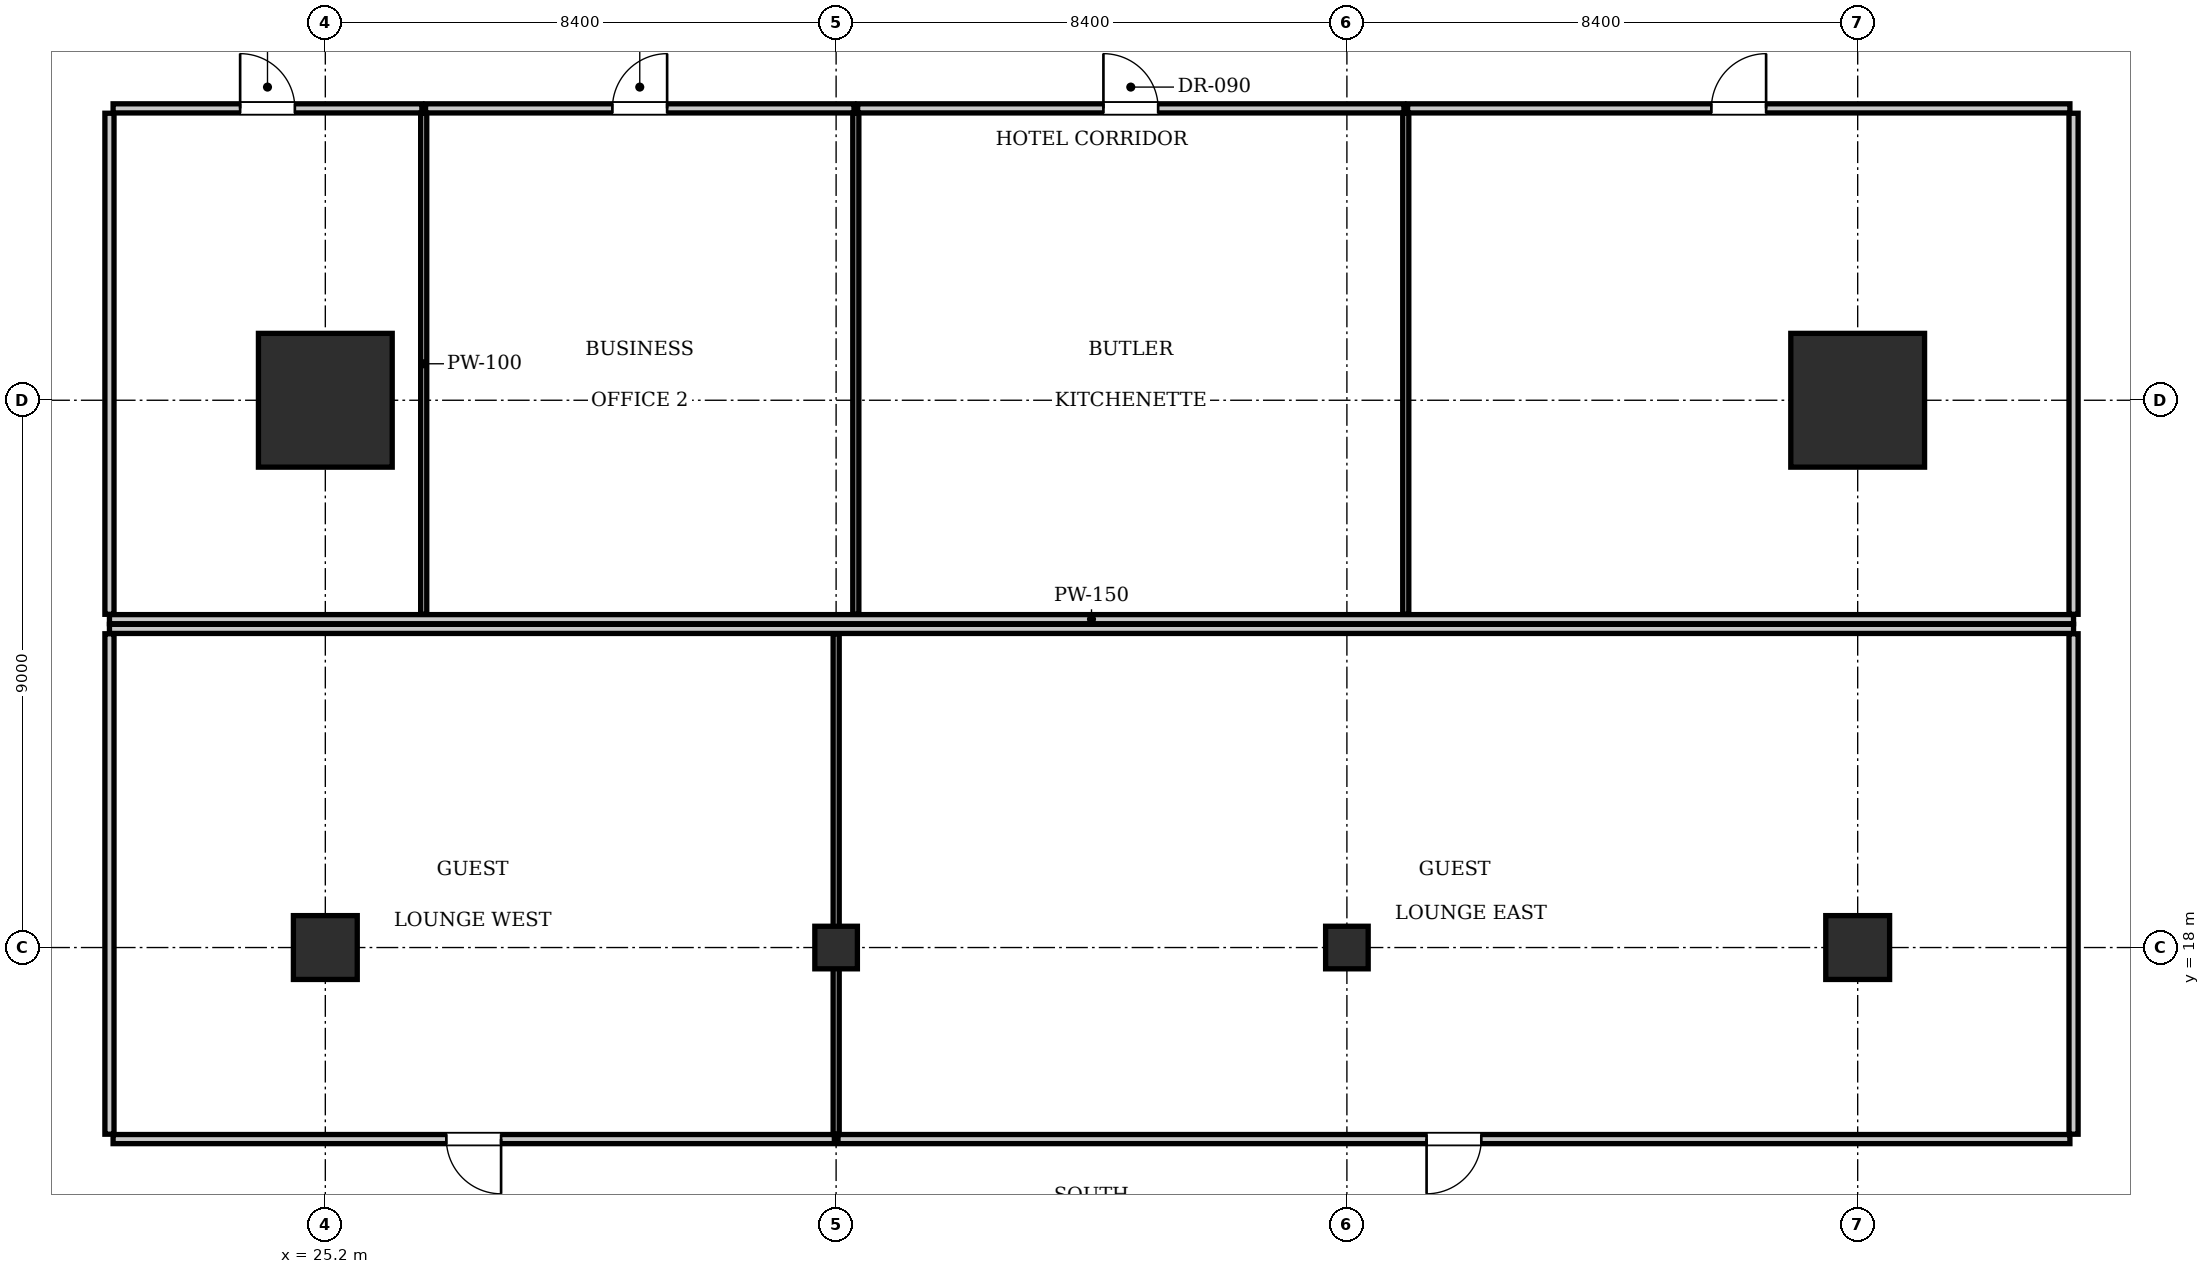
"""IFC4 building model, lengths in metres.
Left out: names, types, materials, properties, quantities, classifications, styles, units other than length and angle.
Written with IfcOpenShell. Run it as: python <this file> out.ifc"""

import sys

from ifc_helpers import new_model, si_unit, direction, frame, frame_2d, origin, origin_2d, place, context, subcontext, project, spatial, rectangle, i_section, extrude, element, fill, save


model = new_model("IFC4")
c1 = context("Model", 3, precision=1e-05, world=origin(), true_north=direction((0.0, 1.0)))
c2 = subcontext(c1, "Body", "Model", "MODEL_VIEW")
j1 = project(units=[si_unit("LENGTHUNIT", "METRE"), si_unit("PLANEANGLEUNIT", "RADIAN")], contexts=[c1])
p1 = place(None, origin())
s1 = spatial("IfcSite", under=j1, at=p1, CompositionType="ELEMENT")
p2 = place(p1, origin())
s2 = spatial("IfcBuilding", under=s1, at=p2, CompositionType="ELEMENT")
p3 = place(p2, frame((0.0, 0.0, 34.65)))
s3 = spatial("IfcBuildingStorey", under=s2, at=p3, CompositionType="ELEMENT", Elevation=34.65)
for number, where, z_axis, x_axis in (
    (1, (25.2, 27.0, 0.0), (0.0, 0.0, 1.0), (1.0, 0.0, 0.0)),
    (2, (50.4, 27.0, 0.0), (0.0, 0.0, 1.0), (1.0, 0.0, 0.0)),
):
    element("IfcColumn", number, at=place(p3, frame(where, z_axis=z_axis, x_axis=x_axis)), inside=s3, PredefinedType="COLUMN", context=c2, shape_type="SweptSolid", body=[
        extrude(rectangle(XDim=2.2, YDim=2.2, at=origin_2d()), origin(), (0.0, 0.0, 1.0), 3.85),
    ])
for number, where, z_axis, x_axis in (
    (3, (25.2, 18.0, 0.0), (0.0, 0.0, 1.0), (1.0, 0.0, 0.0)),
    (4, (50.4, 18.0, 0.0), (0.0, 0.0, 1.0), (1.0, 0.0, 0.0)),
):
    element("IfcColumn", number, at=place(p3, frame(where, z_axis=z_axis, x_axis=x_axis)), inside=s3, PredefinedType="COLUMN", context=c2, shape_type="SweptSolid", body=[
        extrude(rectangle(XDim=1.05, YDim=1.05, at=origin_2d()), origin(), (0.0, 0.0, 1.0), 3.85),
    ])
for number, where, z_axis, x_axis in (
    (5, (33.6, 18.0, 0.0), (0.0, 0.0, 1.0), (1.0, 0.0, 0.0)),
    (6, (42.0, 18.0, 0.0), (0.0, 0.0, 1.0), (1.0, 0.0, 0.0)),
):
    element("IfcColumn", number, at=place(p3, frame(where, z_axis=z_axis, x_axis=x_axis)), inside=s3, PredefinedType="COLUMN", context=c2, shape_type="SweptSolid", body=[
        extrude(i_section(OverallWidth=0.7, OverallDepth=0.7, WebThickness=0.028, FlangeThickness=0.044, at=origin_2d()), origin(), (0.0, 0.0, 1.0), 3.85),
    ])
p4 = place(p3, frame((21.65, 23.4, 0.0), z_axis=(0.0, 0.0, 1.0), x_axis=(1.0, 0.0, 0.0)))
e7 = element("IfcWall", 7, at=p4, inside=s3, PredefinedType="PARTITIONING", context=c2, shape_type="SweptSolid", body=[
    extrude(rectangle(XDim=32.3, YDim=0.15, at=frame_2d((16.15, 0.0))), origin(), (0.0, 0.0, 1.0), 3.61),
])
for number, where, z_axis, x_axis in (
    (8, (21.65, 23.48, 0.0), (0.0, 0.0, 1.0), (0.0, 1.0, 0.0)),
    (9, (53.95, 23.48, 0.0), (0.0, 0.0, 1.0), (0.0, 1.0, 0.0)),
):
    element("IfcWall", number, at=place(p3, frame(where, z_axis=z_axis, x_axis=x_axis)), inside=s3, PredefinedType="PARTITIONING", context=c2, shape_type="SweptSolid", body=[
        extrude(rectangle(XDim=8.24, YDim=0.15, at=frame_2d((4.12, 0.0))), origin(), (0.0, 0.0, 1.0), 3.61),
    ])
p5 = place(p3, frame((21.71, 31.8, 0.0), z_axis=(0.0, 0.0, 1.0), x_axis=(1.0, 0.0, 0.0)))
e10 = element("IfcWall", 10, at=p5, inside=s3, PredefinedType="PARTITIONING", context=c2, shape_type="SweptSolid", body=[
    extrude(rectangle(XDim=5.078, YDim=0.15, at=frame_2d((2.539, 0.0))), origin(), (0.0, 0.0, 1.0), 3.61),
])
p6 = place(p5, frame((2.089, 0.0, 0.0)))
e11 = element("IfcOpeningElement", 11, at=p6, cuts=e10, PredefinedType="OPENING", context=c2, shape_type="SweptSolid", body=[
    extrude(rectangle(XDim=0.9, YDim=2.1, at=frame_2d((0.45, 1.05))), frame((0.0, 0.085, 0.0), z_axis=(0.0, -1.0, 0.0), x_axis=(1.0, 0.0, 0.0)), (0.0, 0.0, 1.0), 0.17),
])
p7 = place(p3, frame((26.818, 23.48, 0.0), z_axis=(0.0, 0.0, 1.0), x_axis=(0.0, 1.0, 0.0)))
e12 = element("IfcWall", 12, at=p7, inside=s3, PredefinedType="PARTITIONING", context=c2, shape_type="SweptSolid", body=[
    extrude(rectangle(XDim=8.24, YDim=0.1, at=frame_2d((4.12, 0.0))), origin(), (0.0, 0.0, 1.0), 3.61),
])
p8 = place(p3, frame((26.848, 31.8, 0.0), z_axis=(0.0, 0.0, 1.0), x_axis=(1.0, 0.0, 0.0)))
e13 = element("IfcWall", 13, at=p8, inside=s3, PredefinedType="PARTITIONING", context=c2, shape_type="SweptSolid", body=[
    extrude(rectangle(XDim=7.046, YDim=0.15, at=frame_2d((3.523, 0.0))), origin(), (0.0, 0.0, 1.0), 3.61),
])
p9 = place(p8, frame((3.073, 0.0, 0.0)))
e14 = element("IfcOpeningElement", 14, at=p9, cuts=e13, PredefinedType="OPENING", context=c2, shape_type="SweptSolid", body=[
    extrude(rectangle(XDim=0.9, YDim=2.1, at=frame_2d((0.45, 1.05))), frame((0.0, 0.085, 0.0), z_axis=(0.0, -1.0, 0.0), x_axis=(1.0, 0.0, 0.0)), (0.0, 0.0, 1.0), 0.17),
])
p10 = place(p3, frame((33.924, 23.48, 0.0), z_axis=(0.0, 0.0, 1.0), x_axis=(0.0, 1.0, 0.0)))
e15 = element("IfcWall", 15, at=p10, inside=s3, PredefinedType="PARTITIONING", context=c2, shape_type="SweptSolid", body=[
    extrude(rectangle(XDim=8.24, YDim=0.1, at=frame_2d((4.12, 0.0))), origin(), (0.0, 0.0, 1.0), 3.61),
])
p11 = place(p3, frame((33.954, 31.8, 0.0), z_axis=(0.0, 0.0, 1.0), x_axis=(1.0, 0.0, 0.0)))
e16 = element("IfcWall", 16, at=p11, inside=s3, PredefinedType="PARTITIONING", context=c2, shape_type="SweptSolid", body=[
    extrude(rectangle(XDim=8.984, YDim=0.15, at=frame_2d((4.492, 0.0))), origin(), (0.0, 0.0, 1.0), 3.61),
])
p12 = place(p11, frame((4.042, 0.0, 0.0)))
e17 = element("IfcOpeningElement", 17, at=p12, cuts=e16, PredefinedType="OPENING", context=c2, shape_type="SweptSolid", body=[
    extrude(rectangle(XDim=0.9, YDim=2.1, at=frame_2d((0.45, 1.05))), frame((0.0, 0.085, 0.0), z_axis=(0.0, -1.0, 0.0), x_axis=(1.0, 0.0, 0.0)), (0.0, 0.0, 1.0), 0.17),
])
p13 = place(p3, frame((42.968, 23.48, 0.0), z_axis=(0.0, 0.0, 1.0), x_axis=(0.0, 1.0, 0.0)))
e18 = element("IfcWall", 18, at=p13, inside=s3, PredefinedType="PARTITIONING", context=c2, shape_type="SweptSolid", body=[
    extrude(rectangle(XDim=8.24, YDim=0.1, at=frame_2d((4.12, 0.0))), origin(), (0.0, 0.0, 1.0), 3.61),
])
p14 = place(p3, frame((42.998, 31.8, 0.0), z_axis=(0.0, 0.0, 1.0), x_axis=(1.0, 0.0, 0.0)))
e19 = element("IfcWall", 19, at=p14, inside=s3, PredefinedType="PARTITIONING", context=c2, shape_type="SweptSolid", body=[
    extrude(rectangle(XDim=10.892, YDim=0.15, at=frame_2d((5.446, 0.0))), origin(), (0.0, 0.0, 1.0), 3.61),
])
p15 = place(p14, frame((4.996, 0.0, 0.0)))
e20 = element("IfcOpeningElement", 20, at=p15, cuts=e19, PredefinedType="OPENING", context=c2, shape_type="SweptSolid", body=[
    extrude(rectangle(XDim=0.9, YDim=2.1, at=frame_2d((0.45, 1.05))), frame((0.0, 0.085, 0.0), z_axis=(0.0, -1.0, 0.0), x_axis=(1.0, 0.0, 0.0)), (0.0, 0.0, 1.0), 0.17),
])
p16 = place(p3, frame((21.65, 23.24, 0.0), z_axis=(0.0, 0.0, 1.0), x_axis=(1.0, 0.0, 0.0)))
e21 = element("IfcWall", 21, at=p16, inside=s3, PredefinedType="PARTITIONING", context=c2, shape_type="SweptSolid", body=[
    extrude(rectangle(XDim=32.3, YDim=0.15, at=frame_2d((16.15, 0.0))), origin(), (0.0, 0.0, 1.0), 3.61),
])
for number, where, z_axis, x_axis in (
    (22, (21.65, 14.93, 0.0), (0.0, 0.0, 1.0), (0.0, 1.0, 0.0)),
    (23, (53.95, 14.93, 0.0), (0.0, 0.0, 1.0), (0.0, 1.0, 0.0)),
):
    element("IfcWall", number, at=place(p3, frame(where, z_axis=z_axis, x_axis=x_axis)), inside=s3, PredefinedType="PARTITIONING", context=c2, shape_type="SweptSolid", body=[
        extrude(rectangle(XDim=8.23, YDim=0.15, at=frame_2d((4.115, 0.0))), origin(), (0.0, 0.0, 1.0), 3.61),
    ])
p17 = place(p3, frame((21.71, 14.85, 0.0), z_axis=(0.0, 0.0, 1.0), x_axis=(1.0, 0.0, 0.0)))
e24 = element("IfcWall", 24, at=p17, inside=s3, PredefinedType="PARTITIONING", context=c2, shape_type="SweptSolid", body=[
    extrude(rectangle(XDim=11.861, YDim=0.15, at=frame_2d((5.931, 0.0))), origin(), (0.0, 0.0, 1.0), 3.61),
])
p18 = place(p17, frame((5.48, 0.0, 0.0)))
e25 = element("IfcOpeningElement", 25, at=p18, cuts=e24, PredefinedType="OPENING", context=c2, shape_type="SweptSolid", body=[
    extrude(rectangle(XDim=0.9, YDim=2.1, at=frame_2d((0.45, 1.05))), frame((0.0, 0.085, 0.0), z_axis=(0.0, -1.0, 0.0), x_axis=(1.0, 0.0, 0.0)), (0.0, 0.0, 1.0), 0.17),
])
p19 = place(p3, frame((33.601, 14.93, 0.0), z_axis=(0.0, 0.0, 1.0), x_axis=(0.0, 1.0, 0.0)))
e26 = element("IfcWall", 26, at=p19, inside=s3, PredefinedType="PARTITIONING", context=c2, shape_type="SweptSolid", body=[
    extrude(rectangle(XDim=8.23, YDim=0.1, at=frame_2d((4.115, 0.0))), origin(), (0.0, 0.0, 1.0), 2.988),
])
p20 = place(p3, frame((33.631, 14.85, 0.0), z_axis=(0.0, 0.0, 1.0), x_axis=(1.0, 0.0, 0.0)))
e27 = element("IfcWall", 27, at=p20, inside=s3, PredefinedType="PARTITIONING", context=c2, shape_type="SweptSolid", body=[
    extrude(rectangle(XDim=20.259, YDim=0.15, at=frame_2d((10.129, 0.0))), origin(), (0.0, 0.0, 1.0), 3.61),
])
p21 = place(p20, frame((9.679, 0.0, 0.0)))
e28 = element("IfcOpeningElement", 28, at=p21, cuts=e27, PredefinedType="OPENING", context=c2, shape_type="SweptSolid", body=[
    extrude(rectangle(XDim=0.9, YDim=2.1, at=frame_2d((0.45, 1.05))), frame((0.0, 0.085, 0.0), z_axis=(0.0, -1.0, 0.0), x_axis=(1.0, 0.0, 0.0)), (0.0, 0.0, 1.0), 0.17),
])
p22 = place(p6, origin())
e29 = element("IfcDoor", 29, at=p22, inside=s3, OperationType="SINGLE_SWING_LEFT", PredefinedType="DOOR", context=c2, shape_type="SweptSolid", body=[
    extrude(rectangle(XDim=0.9, YDim=2.1, at=frame_2d((0.45, 1.05))), frame((0.0, 0.025, 0.0), z_axis=(0.0, -1.0, 0.0), x_axis=(1.0, 0.0, 0.0)), (0.0, 0.0, 1.0), 0.05),
])
fill(e11, e29)
p23 = place(p9, origin())
e30 = element("IfcDoor", 30, at=p23, inside=s3, OperationType="SINGLE_SWING_RIGHT", PredefinedType="DOOR", context=c2, shape_type="SweptSolid", body=[
    extrude(rectangle(XDim=0.9, YDim=2.1, at=frame_2d((0.45, 1.05))), frame((0.0, 0.025, 0.0), z_axis=(0.0, -1.0, 0.0), x_axis=(1.0, 0.0, 0.0)), (0.0, 0.0, 1.0), 0.05),
])
fill(e14, e30)
p24 = place(p12, origin())
e31 = element("IfcDoor", 31, at=p24, inside=s3, OperationType="SINGLE_SWING_LEFT", PredefinedType="DOOR", context=c2, shape_type="SweptSolid", body=[
    extrude(rectangle(XDim=0.9, YDim=2.1, at=frame_2d((0.45, 1.05))), frame((0.0, 0.025, 0.0), z_axis=(0.0, -1.0, 0.0), x_axis=(1.0, 0.0, 0.0)), (0.0, 0.0, 1.0), 0.05),
])
fill(e17, e31)
p25 = place(p15, origin())
e32 = element("IfcDoor", 32, at=p25, inside=s3, OperationType="SINGLE_SWING_RIGHT", PredefinedType="DOOR", context=c2, shape_type="SweptSolid", body=[
    extrude(rectangle(XDim=0.9, YDim=2.1, at=frame_2d((0.45, 1.05))), frame((0.0, 0.025, 0.0), z_axis=(0.0, -1.0, 0.0), x_axis=(1.0, 0.0, 0.0)), (0.0, 0.0, 1.0), 0.05),
])
fill(e20, e32)
p26 = place(p18, frame((0.9, 0.0, 0.0), z_axis=(0.0, 0.0, 1.0), x_axis=(-1.0, 0.0, 0.0)))
e33 = element("IfcDoor", 33, at=p26, inside=s3, OperationType="SINGLE_SWING_LEFT", PredefinedType="DOOR", context=c2, shape_type="SweptSolid", body=[
    extrude(rectangle(XDim=0.9, YDim=2.1, at=frame_2d((0.45, 1.05))), frame((0.0, 0.025, 0.0), z_axis=(0.0, -1.0, 0.0), x_axis=(1.0, 0.0, 0.0)), (0.0, 0.0, 1.0), 0.05),
])
fill(e25, e33)
p27 = place(p21, frame((0.9, 0.0, 0.0), z_axis=(0.0, 0.0, 1.0), x_axis=(-1.0, 0.0, 0.0)))
e34 = element("IfcDoor", 34, at=p27, inside=s3, OperationType="SINGLE_SWING_RIGHT", PredefinedType="DOOR", context=c2, shape_type="SweptSolid", body=[
    extrude(rectangle(XDim=0.9, YDim=2.1, at=frame_2d((0.45, 1.05))), frame((0.0, 0.025, 0.0), z_axis=(0.0, -1.0, 0.0), x_axis=(1.0, 0.0, 0.0)), (0.0, 0.0, 1.0), 0.05),
])
fill(e28, e34)
save(model, sys.argv[1])
